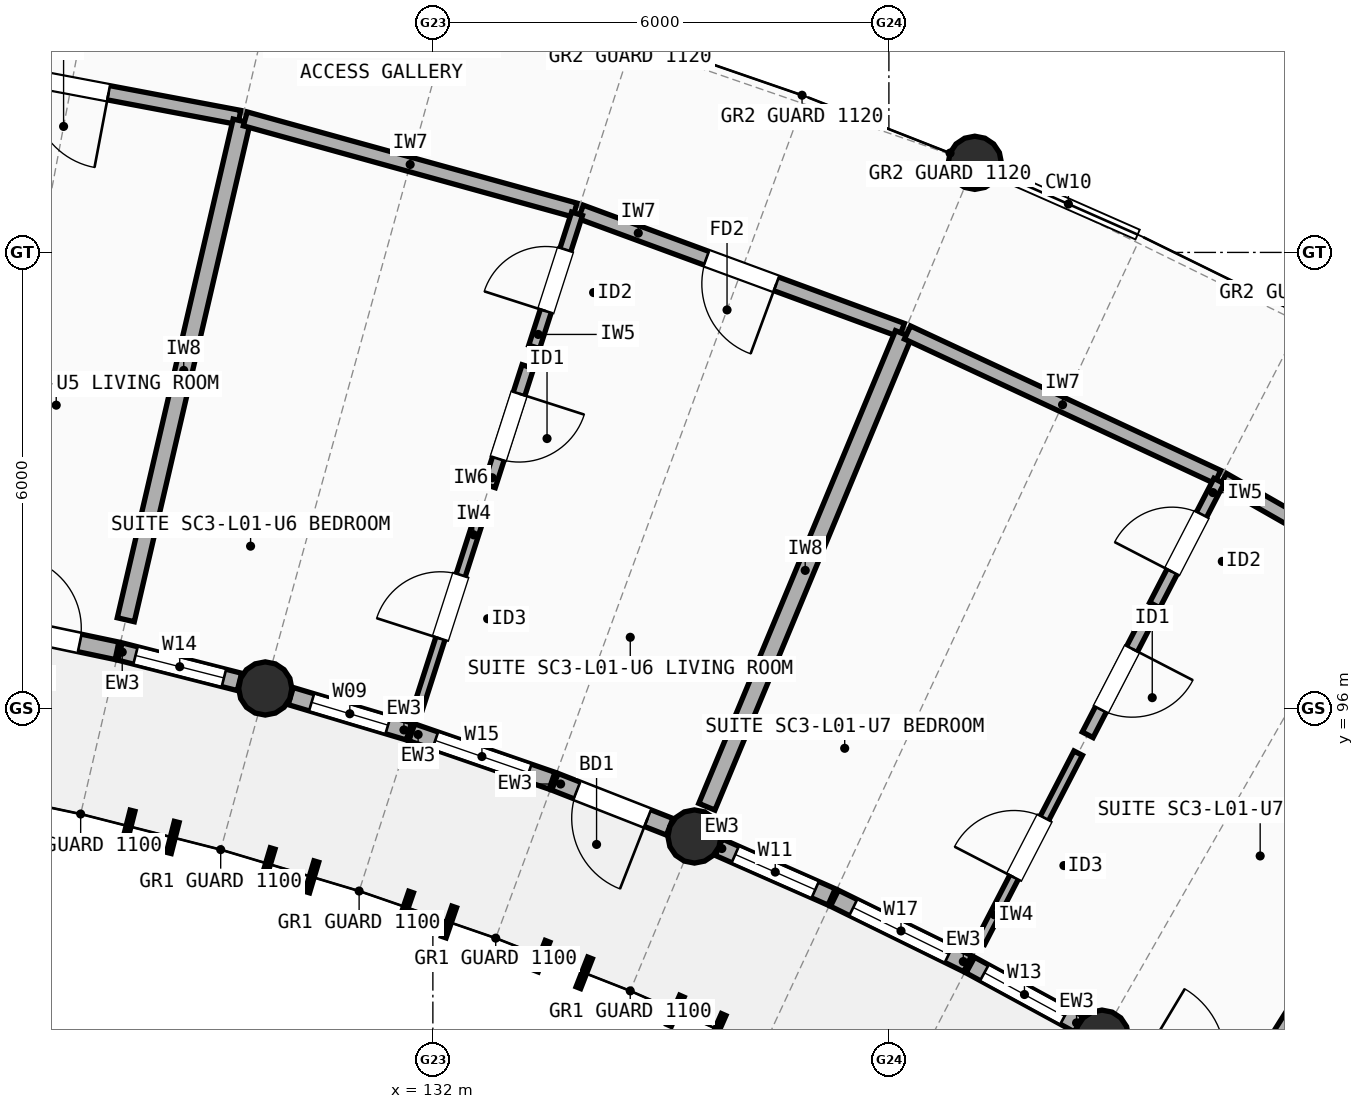
"""IFC4 building model, lengths in metres.
Left out: names, types, materials, properties, quantities, classifications, styles, units other than length and angle.
Written with IfcOpenShell. Run it as: python <this file> out.ifc"""

import sys

from ifc_helpers import new_model, si_unit, direction, frame, frame_2d, origin, origin_2d, place, context, subcontext, project, spatial, rectangle, circle, extrude, element, fill, save


model = new_model("IFC4")
c1 = context("Model", 3, precision=1e-05, world=origin(), true_north=direction((0.0, 1.0)))
c2 = subcontext(c1, "Body", "Model", "MODEL_VIEW")
j1 = project(units=[si_unit("LENGTHUNIT", "METRE"), si_unit("PLANEANGLEUNIT", "RADIAN")], contexts=[c1])
p1 = place(None, origin())
s1 = spatial("IfcSite", under=j1, at=p1, CompositionType="ELEMENT")
p2 = place(p1, origin())
s2 = spatial("IfcBuilding", under=s1, at=p2, CompositionType="ELEMENT")
p3 = place(p2, frame((0.0, 0.0, 4.5)))
s3 = spatial("IfcBuildingStorey", under=s2, at=p3, CompositionType="ELEMENT", Elevation=4.5)
for number, where, z_axis, x_axis in (
    (1, (129.795, 96.263, 0.0), (0.0, 0.0, 1.0), (1.0, 0.0, 0.0)),
    (2, (135.442, 94.316, 0.0), (0.0, 0.0, 1.0), (1.0, 0.0, 0.0)),
    (3, (139.13, 103.179, 0.0), (0.0, 0.0, 1.0), (1.0, 0.0, 0.0)),
    (4, (140.804, 91.682, 0.0), (0.0, 0.0, 1.0), (1.0, 0.0, 0.0)),
):
    element("IfcColumn", number, at=place(p3, frame(where, z_axis=z_axis, x_axis=x_axis)), inside=s3, PredefinedType="COLUMN", context=c2, shape_type="SweptSolid", body=[
        extrude(circle(Radius=0.35, at=origin_2d()), origin(), (0.0, 0.0, 1.0), 2.948),
    ])
p4 = place(p3, frame((125.934, 97.161, 0.0), z_axis=(0.0, 0.0, 1.0), x_axis=(0.978533860292, -0.206086108851, 0.0)))
e5 = element("IfcWall", 5, at=p4, inside=s3, PredefinedType="STANDARD", context=c2, shape_type="SweptSolid", body=[
    extrude(rectangle(XDim=1.952, YDim=0.235, at=frame_2d((0.976, 0.0))), origin(), (0.0, 0.0, 1.0), 2.684),
])
p5 = place(p4, frame((0.501, 0.0, 0.0)))
e6 = element("IfcOpeningElement", 6, at=p5, cuts=e5, PredefinedType="OPENING", context=c2, shape_type="SweptSolid", body=[
    extrude(rectangle(XDim=0.95, YDim=2.12, at=frame_2d((0.475, 1.06))), frame((0.0, 0.127, 0.0), z_axis=(0.0, -1.0, 0.0), x_axis=(1.0, 0.0, 0.0)), (0.0, 0.0, 1.0), 0.255),
])
p6 = place(p3, frame((127.883, 96.75, 0.0), z_axis=(0.0, 0.0, 1.0), x_axis=(0.969142943716, -0.246499400902, 0.0)))
e7 = element("IfcWall", 7, at=p6, inside=s3, PredefinedType="STANDARD", context=c2, shape_type="SweptSolid", body=[
    extrude(rectangle(XDim=1.622, YDim=0.235, at=frame_2d((0.811, 0.0))), origin(), (0.0, 0.0, 1.0), 2.684),
])
p7 = place(p6, frame((0.211, 0.0, 0.85)))
e8 = element("IfcOpeningElement", 8, at=p7, cuts=e7, PredefinedType="OPENING", context=c2, shape_type="SweptSolid", body=[
    extrude(rectangle(XDim=1.2, YDim=1.5, at=frame_2d((0.6, 0.75))), frame((0.0, 0.127, 0.0), z_axis=(0.0, -1.0, 0.0), x_axis=(1.0, 0.0, 0.0)), (0.0, 0.0, 1.0), 0.255),
])
p8 = place(p3, frame((130.13, 96.163, 0.0), z_axis=(0.0, 0.0, 1.0), x_axis=(0.958078548486, -0.286505662999, 0.0)))
e9 = element("IfcWall", 9, at=p8, inside=s3, PredefinedType="STANDARD", context=c2, shape_type="SweptSolid", body=[
    extrude(rectangle(XDim=1.623, YDim=0.235, at=frame_2d((0.811, 0.0))), origin(), (0.0, 0.0, 1.0), 2.684),
])
p9 = place(p8, frame((0.286, 0.0, 0.85)))
e10 = element("IfcOpeningElement", 10, at=p9, cuts=e9, PredefinedType="OPENING", context=c2, shape_type="SweptSolid", body=[
    extrude(rectangle(XDim=1.05, YDim=1.35, at=frame_2d((0.525, 0.675))), frame((0.0, 0.127, 0.0), z_axis=(0.0, -1.0, 0.0), x_axis=(1.0, 0.0, 0.0)), (0.0, 0.0, 1.0), 0.255),
])
p10 = place(p3, frame((131.722, 95.686, 0.0), z_axis=(0.0, 0.0, 1.0), x_axis=(0.945368994877, -0.326002244662, 0.0)))
e11 = element("IfcWall", 11, at=p10, inside=s3, PredefinedType="STANDARD", context=c2, shape_type="SweptSolid", body=[
    extrude(rectangle(XDim=1.952, YDim=0.235, at=frame_2d((0.976, 0.0))), origin(), (0.0, 0.0, 1.0), 2.684),
])
p11 = place(p10, frame((0.326, 0.0, 0.85)))
e12 = element("IfcOpeningElement", 12, at=p11, cuts=e11, PredefinedType="OPENING", context=c2, shape_type="SweptSolid", body=[
    extrude(rectangle(XDim=1.3, YDim=1.45, at=frame_2d((0.65, 0.725))), frame((0.0, 0.127, 0.0), z_axis=(0.0, -1.0, 0.0), x_axis=(1.0, 0.0, 0.0)), (0.0, 0.0, 1.0), 0.255),
])
p12 = place(p3, frame((133.606, 95.036, 0.0), z_axis=(0.0, 0.0, 1.0), x_axis=(0.931038371221, -0.364921294684, 0.0)))
e13 = element("IfcWall", 13, at=p12, inside=s3, PredefinedType="STANDARD", context=c2, shape_type="SweptSolid", body=[
    extrude(rectangle(XDim=1.622, YDim=0.235, at=frame_2d((0.811, 0.0))), origin(), (0.0, 0.0, 1.0), 2.684),
])
p13 = place(p12, frame((0.311, 0.0, 0.0)))
e14 = element("IfcOpeningElement", 14, at=p13, cuts=e13, PredefinedType="OPENING", context=c2, shape_type="SweptSolid", body=[
    extrude(rectangle(XDim=1.0, YDim=2.15, at=frame_2d((0.5, 1.075))), frame((0.0, 0.127, 0.0), z_axis=(0.0, -1.0, 0.0), x_axis=(1.0, 0.0, 0.0)), (0.0, 0.0, 1.0), 0.255),
])
p14 = place(p3, frame((135.762, 94.175, 0.0), z_axis=(0.0, 0.0, 1.0), x_axis=(0.915073009016, -0.403288219727, 0.0)))
e15 = element("IfcWall", 15, at=p14, inside=s3, PredefinedType="STANDARD", context=c2, shape_type="SweptSolid", body=[
    extrude(rectangle(XDim=1.622, YDim=0.235, at=frame_2d((0.811, 0.0))), origin(), (0.0, 0.0, 1.0), 2.684),
])
p15 = place(p14, frame((0.236, 0.0, 0.85)))
e16 = element("IfcOpeningElement", 16, at=p15, cuts=e15, PredefinedType="OPENING", context=c2, shape_type="SweptSolid", body=[
    extrude(rectangle(XDim=1.15, YDim=1.45, at=frame_2d((0.575, 0.725))), frame((0.0, 0.127, 0.0), z_axis=(0.0, -1.0, 0.0), x_axis=(1.0, 0.0, 0.0)), (0.0, 0.0, 1.0), 0.255),
])
p16 = place(p3, frame((137.283, 93.503, 0.0), z_axis=(0.0, 0.0, 1.0), x_axis=(0.897531751182, -0.44094983345, 0.0)))
e17 = element("IfcWall", 17, at=p16, inside=s3, PredefinedType="STANDARD", context=c2, shape_type="SweptSolid", body=[
    extrude(rectangle(XDim=1.952, YDim=0.235, at=frame_2d((0.976, 0.0))), origin(), (0.0, 0.0, 1.0), 2.684),
])
p17 = place(p16, frame((0.276, 0.0, 0.85)))
e18 = element("IfcOpeningElement", 18, at=p17, cuts=e17, PredefinedType="OPENING", context=c2, shape_type="SweptSolid", body=[
    extrude(rectangle(XDim=1.4, YDim=1.5, at=frame_2d((0.7, 0.75))), frame((0.0, 0.127, 0.0), z_axis=(0.0, -1.0, 0.0), x_axis=(1.0, 0.0, 0.0)), (0.0, 0.0, 1.0), 0.255),
])
p18 = place(p3, frame((139.071, 92.624, 0.0), z_axis=(0.0, 0.0, 1.0), x_axis=(0.878452871629, -0.477828999044, 0.0)))
e19 = element("IfcWall", 19, at=p18, inside=s3, PredefinedType="STANDARD", context=c2, shape_type="SweptSolid", body=[
    extrude(rectangle(XDim=1.622, YDim=0.235, at=frame_2d((0.811, 0.0))), origin(), (0.0, 0.0, 1.0), 2.684),
])
p19 = place(p18, frame((0.211, 0.0, 0.85)))
e20 = element("IfcOpeningElement", 20, at=p19, cuts=e19, PredefinedType="OPENING", context=c2, shape_type="SweptSolid", body=[
    extrude(rectangle(XDim=1.2, YDim=1.45, at=frame_2d((0.6, 0.725))), frame((0.0, 0.127, 0.0), z_axis=(0.0, -1.0, 0.0), x_axis=(1.0, 0.0, 0.0)), (0.0, 0.0, 1.0), 0.255),
])
p20 = place(p3, frame((125.031, 104.611, 0.0), z_axis=(0.0, 0.0, 1.0), x_axis=(0.982595404078, -0.18575863879, 0.0)))
e21 = element("IfcWall", 21, at=p20, inside=s3, PredefinedType="SOLIDWALL", context=c2, shape_type="SweptSolid", body=[
    extrude(rectangle(XDim=4.501, YDim=0.19, at=frame_2d((2.251, 0.0))), origin(), (0.0, 0.0, 1.0), 2.742),
])
p21 = place(p20, frame((1.751, 0.0, 0.0)))
e22 = element("IfcOpeningElement", 22, at=p21, cuts=e21, PredefinedType="OPENING", context=c2, shape_type="SweptSolid", body=[
    extrude(rectangle(XDim=1.0, YDim=2.15, at=frame_2d((0.5, 1.075))), frame((0.0, 0.105, 0.0), z_axis=(0.0, -1.0, 0.0), x_axis=(1.0, 0.0, 0.0)), (0.0, 0.0, 1.0), 0.21),
])
p22 = place(p3, frame((127.96, 97.167, 0.0), z_axis=(0.0, 0.0, 1.0), x_axis=(0.226349561734, 0.974046136434, 0.0)))
e23 = element("IfcWall", 23, at=p22, inside=s3, PredefinedType="SOLIDWALL", context=c2, shape_type="SweptSolid", body=[
    extrude(rectangle(XDim=6.736, YDim=0.23, at=frame_2d((3.368, 0.0))), origin(), (0.0, 0.0, 1.0), 2.762),
])
p23 = place(p3, frame((129.532, 103.757, 0.0), z_axis=(0.0, 0.0, 1.0), x_axis=(0.963830390038, -0.266516377055, 0.0)))
e24 = element("IfcWall", 24, at=p23, inside=s3, PredefinedType="SOLIDWALL", context=c2, shape_type="SweptSolid", body=[
    extrude(rectangle(XDim=4.501, YDim=0.19, at=frame_2d((2.251, 0.0))), origin(), (0.0, 0.0, 1.0), 2.722),
])
p24 = place(p3, frame((133.947, 102.533, 0.0), z_axis=(0.0, 0.0, 1.0), x_axis=(0.93839218154, -0.345572154006, 0.0)))
e25 = element("IfcWall", 25, at=p24, inside=s3, PredefinedType="SOLIDWALL", context=c2, shape_type="SweptSolid", body=[
    extrude(rectangle(XDim=4.502, YDim=0.19, at=frame_2d((2.251, 0.0))), origin(), (0.0, 0.0, 1.0), 2.762),
])
p25 = place(p24, frame((1.761, 0.0, 0.0)))
e26 = element("IfcOpeningElement", 26, at=p25, cuts=e25, PredefinedType="OPENING", context=c2, shape_type="SweptSolid", body=[
    extrude(rectangle(XDim=0.98, YDim=2.15, at=frame_2d((0.49, 1.075))), frame((0.0, 0.105, 0.0), z_axis=(0.0, -1.0, 0.0), x_axis=(1.0, 0.0, 0.0)), (0.0, 0.0, 1.0), 0.21),
])
p26 = place(p3, frame((131.804, 96.005, 0.0), z_axis=(0.0, 0.0, 1.0), x_axis=(0.306243449584, 0.951953228676, 0.0)))
e27 = element("IfcWall", 27, at=p26, inside=s3, PredefinedType="PARTITIONING", context=c2, shape_type="SweptSolid", body=[
    extrude(rectangle(XDim=2.8, YDim=0.125, at=frame_2d((1.4, 0.0))), origin(), (0.0, 0.0, 1.0), 2.742),
])
p27 = place(p26, frame((0.96, 0.0, 0.0)))
e28 = element("IfcOpeningElement", 28, at=p27, cuts=e27, PredefinedType="OPENING", context=c2, shape_type="SweptSolid", body=[
    extrude(rectangle(XDim=0.88, YDim=2.1, at=frame_2d((0.44, 1.05))), frame((0.0, 0.073, 0.0), z_axis=(0.0, -1.0, 0.0), x_axis=(1.0, 0.0, 0.0)), (0.0, 0.0, 1.0), 0.145),
])
p28 = place(p3, frame((132.745, 98.929, 0.0), z_axis=(0.0, 0.0, 1.0), x_axis=(0.306388026226, 0.95190670624, 0.0)))
e29 = element("IfcWall", 29, at=p28, inside=s3, PredefinedType="PLUMBINGWALL", context=c2, shape_type="SweptSolid", body=[
    extrude(rectangle(XDim=1.648, YDim=0.16, at=frame_2d((0.824, 0.0))), origin(), (0.0, 0.0, 1.0), 2.742),
])
p29 = place(p28, frame((0.374, 0.0, 0.0)))
e30 = element("IfcOpeningElement", 30, at=p29, cuts=e29, PredefinedType="OPENING", context=c2, shape_type="SweptSolid", body=[
    extrude(rectangle(XDim=0.9, YDim=2.1, at=frame_2d((0.45, 1.05))), frame((0.0, 0.09, 0.0), z_axis=(0.0, -1.0, 0.0), x_axis=(1.0, 0.0, 0.0)), (0.0, 0.0, 1.0), 0.18),
])
p30 = place(p3, frame((133.333, 100.757, 0.0), z_axis=(0.0, 0.0, 1.0), x_axis=(0.306258297612, 0.951948451936, 0.0)))
e31 = element("IfcWall", 31, at=p30, inside=s3, PredefinedType="PARTITIONING", context=c2, shape_type="SweptSolid", body=[
    extrude(rectangle(XDim=1.84, YDim=0.15, at=frame_2d((0.92, 0.0))), origin(), (0.0, 0.0, 1.0), 2.742),
])
p31 = place(p30, frame((0.495, 0.0, 0.0)))
e32 = element("IfcOpeningElement", 32, at=p31, cuts=e31, PredefinedType="OPENING", context=c2, shape_type="SweptSolid", body=[
    extrude(rectangle(XDim=0.85, YDim=2.1, at=frame_2d((0.425, 1.05))), frame((0.0, 0.085, 0.0), z_axis=(0.0, -1.0, 0.0), x_axis=(1.0, 0.0, 0.0)), (0.0, 0.0, 1.0), 0.17),
])
p32 = place(p3, frame((135.605, 94.707, 0.0), z_axis=(0.0, 0.0, 1.0), x_axis=(0.384190705314, 0.923253758157, 0.0)))
e33 = element("IfcWall", 33, at=p32, inside=s3, PredefinedType="SOLIDWALL", context=c2, shape_type="SweptSolid", body=[
    extrude(rectangle(XDim=6.736, YDim=0.23, at=frame_2d((3.368, 0.0))), origin(), (0.0, 0.0, 1.0), 2.722),
])
p33 = place(p3, frame((138.245, 100.946, 0.0), z_axis=(0.0, 0.0, 1.0), x_axis=(0.906512639591, -0.422178675755, 0.0)))
e34 = element("IfcWall", 34, at=p33, inside=s3, PredefinedType="SOLIDWALL", context=c2, shape_type="SweptSolid", body=[
    extrude(rectangle(XDim=4.501, YDim=0.19, at=frame_2d((2.251, 0.0))), origin(), (0.0, 0.0, 1.0), 2.742),
])
p34 = place(p3, frame((142.396, 99.009, 0.0), z_axis=(0.0, 0.0, 1.0), x_axis=(0.868376606973, -0.495905301909, 0.0)))
e35 = element("IfcWall", 35, at=p34, inside=s3, PredefinedType="SOLIDWALL", context=c2, shape_type="SweptSolid", body=[
    extrude(rectangle(XDim=4.502, YDim=0.19, at=frame_2d((2.251, 0.0))), origin(), (0.0, 0.0, 1.0), 2.722),
])
p35 = place(p34, frame((1.726, 0.0, 0.0)))
e36 = element("IfcOpeningElement", 36, at=p35, cuts=e35, PredefinedType="OPENING", context=c2, shape_type="SweptSolid", body=[
    extrude(rectangle(XDim=1.05, YDim=2.15, at=frame_2d((0.525, 1.075))), frame((0.0, 0.105, 0.0), z_axis=(0.0, -1.0, 0.0), x_axis=(1.0, 0.0, 0.0)), (0.0, 0.0, 1.0), 0.21),
])
p36 = place(p3, frame((139.204, 92.925, 0.0), z_axis=(0.0, 0.0, 1.0), x_axis=(0.459449012792, 0.888204145816, 0.0)))
e37 = element("IfcWall", 37, at=p36, inside=s3, PredefinedType="PARTITIONING", context=c2, shape_type="SweptSolid", body=[
    extrude(rectangle(XDim=2.8, YDim=0.125, at=frame_2d((1.4, 0.0))), origin(), (0.0, 0.0, 1.0), 2.762),
])
p37 = place(p36, frame((0.96, 0.0, 0.0)))
e38 = element("IfcOpeningElement", 38, at=p37, cuts=e37, PredefinedType="OPENING", context=c2, shape_type="SweptSolid", body=[
    extrude(rectangle(XDim=0.88, YDim=2.1, at=frame_2d((0.44, 1.05))), frame((0.0, 0.073, 0.0), z_axis=(0.0, -1.0, 0.0), x_axis=(1.0, 0.0, 0.0)), (0.0, 0.0, 1.0), 0.145),
])
p38 = place(p3, frame((140.615, 95.654, 0.0), z_axis=(0.0, 0.0, 1.0), x_axis=(0.459495453195, 0.888180121649, 0.0)))
e39 = element("IfcWall", 39, at=p38, inside=s3, PredefinedType="PLUMBINGWALL", context=c2, shape_type="SweptSolid", body=[
    extrude(rectangle(XDim=1.648, YDim=0.16, at=frame_2d((0.824, 0.0))), origin(), (0.0, 0.0, 1.0), 2.762),
])
p39 = place(p38, frame((0.374, 0.0, 0.0)))
e40 = element("IfcOpeningElement", 40, at=p39, cuts=e39, PredefinedType="OPENING", context=c2, shape_type="SweptSolid", body=[
    extrude(rectangle(XDim=0.9, YDim=2.1, at=frame_2d((0.45, 1.05))), frame((0.0, 0.09, 0.0), z_axis=(0.0, -1.0, 0.0), x_axis=(1.0, 0.0, 0.0)), (0.0, 0.0, 1.0), 0.18),
])
p40 = place(p3, frame((141.498, 97.359, 0.0), z_axis=(0.0, 0.0, 1.0), x_axis=(0.459379600499, 0.888240047873, 0.0)))
e41 = element("IfcWall", 41, at=p40, inside=s3, PredefinedType="PARTITIONING", context=c2, shape_type="SweptSolid", body=[
    extrude(rectangle(XDim=1.84, YDim=0.15, at=frame_2d((0.92, 0.0))), origin(), (0.0, 0.0, 1.0), 2.762),
])
p41 = place(p40, frame((0.495, 0.0, 0.0)))
e42 = element("IfcOpeningElement", 42, at=p41, cuts=e41, PredefinedType="OPENING", context=c2, shape_type="SweptSolid", body=[
    extrude(rectangle(XDim=0.85, YDim=2.1, at=frame_2d((0.425, 1.05))), frame((0.0, 0.085, 0.0), z_axis=(0.0, -1.0, 0.0), x_axis=(1.0, 0.0, 0.0)), (0.0, 0.0, 1.0), 0.17),
])
p42 = place(p3, frame((142.738, 91.017, 0.0), z_axis=(0.0, 0.0, 1.0), x_axis=(0.531512997039, 0.847050136638, 0.0)))
e43 = element("IfcWall", 43, at=p42, inside=s3, PredefinedType="SOLIDWALL", context=c2, shape_type="SweptSolid", body=[
    extrude(rectangle(XDim=6.736, YDim=0.23, at=frame_2d((3.368, 0.0))), origin(), (0.0, 0.0, 1.0), 2.742),
])
p43 = place(p5, frame((0.95, 0.0, 0.0), z_axis=(0.0, 0.0, 1.0), x_axis=(-1.0, 0.0, 0.0)))
e44 = element("IfcDoor", 44, at=p43, inside=s3, OperationType="SINGLE_SWING_LEFT", PredefinedType="DOOR", context=c2, shape_type="SweptSolid", body=[
    extrude(rectangle(XDim=0.95, YDim=2.12, at=frame_2d((0.475, 1.06))), frame((0.0, 0.025, 0.0), z_axis=(0.0, -1.0, 0.0), x_axis=(1.0, 0.0, 0.0)), (0.0, 0.0, 1.0), 0.05),
])
fill(e6, e44)
p44 = place(p7, origin())
e45 = element("IfcWindow", 45, at=p44, inside=s3, PartitioningType="SINGLE_PANEL", PredefinedType="WINDOW", context=c2, shape_type="SweptSolid", body=[
    extrude(rectangle(XDim=1.2, YDim=1.5, at=frame_2d((0.6, 0.75))), frame((0.0, 0.03, 0.0), z_axis=(0.0, -1.0, 0.0), x_axis=(1.0, 0.0, 0.0)), (0.0, 0.0, 1.0), 0.06),
])
fill(e8, e45)
p45 = place(p9, origin())
e46 = element("IfcWindow", 46, at=p45, inside=s3, PartitioningType="SINGLE_PANEL", PredefinedType="WINDOW", context=c2, shape_type="SweptSolid", body=[
    extrude(rectangle(XDim=1.05, YDim=1.35, at=frame_2d((0.525, 0.675))), frame((0.0, 0.03, 0.0), z_axis=(0.0, -1.0, 0.0), x_axis=(1.0, 0.0, 0.0)), (0.0, 0.0, 1.0), 0.06),
])
fill(e10, e46)
p46 = place(p11, origin())
e47 = element("IfcWindow", 47, at=p46, inside=s3, PartitioningType="SINGLE_PANEL", PredefinedType="WINDOW", context=c2, shape_type="SweptSolid", body=[
    extrude(rectangle(XDim=1.3, YDim=1.45, at=frame_2d((0.65, 0.725))), frame((0.0, 0.03, 0.0), z_axis=(0.0, -1.0, 0.0), x_axis=(1.0, 0.0, 0.0)), (0.0, 0.0, 1.0), 0.06),
])
fill(e12, e47)
p47 = place(p13, frame((1.0, 0.0, 0.0), z_axis=(0.0, 0.0, 1.0), x_axis=(-1.0, 0.0, 0.0)))
e48 = element("IfcDoor", 48, at=p47, inside=s3, OperationType="SINGLE_SWING_RIGHT", PredefinedType="DOOR", context=c2, shape_type="SweptSolid", body=[
    extrude(rectangle(XDim=1.0, YDim=2.15, at=frame_2d((0.5, 1.075))), frame((0.0, 0.025, 0.0), z_axis=(0.0, -1.0, 0.0), x_axis=(1.0, 0.0, 0.0)), (0.0, 0.0, 1.0), 0.05),
])
fill(e14, e48)
p48 = place(p15, origin())
e49 = element("IfcWindow", 49, at=p48, inside=s3, PartitioningType="SINGLE_PANEL", PredefinedType="WINDOW", context=c2, shape_type="SweptSolid", body=[
    extrude(rectangle(XDim=1.15, YDim=1.45, at=frame_2d((0.575, 0.725))), frame((0.0, 0.03, 0.0), z_axis=(0.0, -1.0, 0.0), x_axis=(1.0, 0.0, 0.0)), (0.0, 0.0, 1.0), 0.06),
])
fill(e16, e49)
p49 = place(p17, origin())
e50 = element("IfcWindow", 50, at=p49, inside=s3, PartitioningType="SINGLE_PANEL", PredefinedType="WINDOW", context=c2, shape_type="SweptSolid", body=[
    extrude(rectangle(XDim=1.4, YDim=1.5, at=frame_2d((0.7, 0.75))), frame((0.0, 0.03, 0.0), z_axis=(0.0, -1.0, 0.0), x_axis=(1.0, 0.0, 0.0)), (0.0, 0.0, 1.0), 0.06),
])
fill(e18, e50)
p50 = place(p19, origin())
e51 = element("IfcWindow", 51, at=p50, inside=s3, PartitioningType="SINGLE_PANEL", PredefinedType="WINDOW", context=c2, shape_type="SweptSolid", body=[
    extrude(rectangle(XDim=1.2, YDim=1.45, at=frame_2d((0.6, 0.725))), frame((0.0, 0.03, 0.0), z_axis=(0.0, -1.0, 0.0), x_axis=(1.0, 0.0, 0.0)), (0.0, 0.0, 1.0), 0.06),
])
fill(e20, e51)
p51 = place(p21, origin())
e52 = element("IfcDoor", 52, at=p51, inside=s3, OperationType="SINGLE_SWING_RIGHT", PredefinedType="DOOR", context=c2, shape_type="SweptSolid", body=[
    extrude(rectangle(XDim=1.0, YDim=2.15, at=frame_2d((0.5, 1.075))), frame((0.0, 0.025, 0.0), z_axis=(0.0, -1.0, 0.0), x_axis=(1.0, 0.0, 0.0)), (0.0, 0.0, 1.0), 0.05),
])
fill(e22, e52)
p52 = place(p25, origin())
e53 = element("IfcDoor", 53, at=p52, inside=s3, OperationType="SINGLE_SWING_RIGHT", PredefinedType="DOOR", context=c2, shape_type="SweptSolid", body=[
    extrude(rectangle(XDim=0.98, YDim=2.15, at=frame_2d((0.49, 1.075))), frame((0.0, 0.025, 0.0), z_axis=(0.0, -1.0, 0.0), x_axis=(1.0, 0.0, 0.0)), (0.0, 0.0, 1.0), 0.05),
])
fill(e26, e53)
p53 = place(p27, origin())
e54 = element("IfcDoor", 54, at=p53, inside=s3, OperationType="SINGLE_SWING_LEFT", PredefinedType="DOOR", context=c2, shape_type="SweptSolid", body=[
    extrude(rectangle(XDim=0.88, YDim=2.1, at=frame_2d((0.44, 1.05))), frame((0.0, 0.025, 0.0), z_axis=(0.0, -1.0, 0.0), x_axis=(1.0, 0.0, 0.0)), (0.0, 0.0, 1.0), 0.05),
])
fill(e28, e54)
p54 = place(p29, origin())
e55 = element("IfcDoor", 55, at=p54, inside=s3, OperationType="SINGLE_SWING_RIGHT", PredefinedType="DOOR", context=c2, shape_type="SweptSolid", body=[
    extrude(rectangle(XDim=0.9, YDim=2.1, at=frame_2d((0.45, 1.05))), frame((0.0, 0.025, 0.0), z_axis=(0.0, -1.0, 0.0), x_axis=(1.0, 0.0, 0.0)), (0.0, 0.0, 1.0), 0.05),
])
fill(e30, e55)
p55 = place(p31, origin())
e56 = element("IfcDoor", 56, at=p55, inside=s3, OperationType="SINGLE_SWING_LEFT", PredefinedType="DOOR", context=c2, shape_type="SweptSolid", body=[
    extrude(rectangle(XDim=0.85, YDim=2.1, at=frame_2d((0.425, 1.05))), frame((0.0, 0.025, 0.0), z_axis=(0.0, -1.0, 0.0), x_axis=(1.0, 0.0, 0.0)), (0.0, 0.0, 1.0), 0.05),
])
fill(e32, e56)
p56 = place(p37, origin())
e57 = element("IfcDoor", 57, at=p56, inside=s3, OperationType="SINGLE_SWING_LEFT", PredefinedType="DOOR", context=c2, shape_type="SweptSolid", body=[
    extrude(rectangle(XDim=0.88, YDim=2.1, at=frame_2d((0.44, 1.05))), frame((0.0, 0.025, 0.0), z_axis=(0.0, -1.0, 0.0), x_axis=(1.0, 0.0, 0.0)), (0.0, 0.0, 1.0), 0.05),
])
fill(e38, e57)
p57 = place(p39, origin())
e58 = element("IfcDoor", 58, at=p57, inside=s3, OperationType="SINGLE_SWING_RIGHT", PredefinedType="DOOR", context=c2, shape_type="SweptSolid", body=[
    extrude(rectangle(XDim=0.9, YDim=2.1, at=frame_2d((0.45, 1.05))), frame((0.0, 0.025, 0.0), z_axis=(0.0, -1.0, 0.0), x_axis=(1.0, 0.0, 0.0)), (0.0, 0.0, 1.0), 0.05),
])
fill(e40, e58)
p58 = place(p41, origin())
e59 = element("IfcDoor", 59, at=p58, inside=s3, OperationType="SINGLE_SWING_LEFT", PredefinedType="DOOR", context=c2, shape_type="SweptSolid", body=[
    extrude(rectangle(XDim=0.85, YDim=2.1, at=frame_2d((0.425, 1.05))), frame((0.0, 0.025, 0.0), z_axis=(0.0, -1.0, 0.0), x_axis=(1.0, 0.0, 0.0)), (0.0, 0.0, 1.0), 0.05),
])
fill(e42, e59)
save(model, sys.argv[1])
